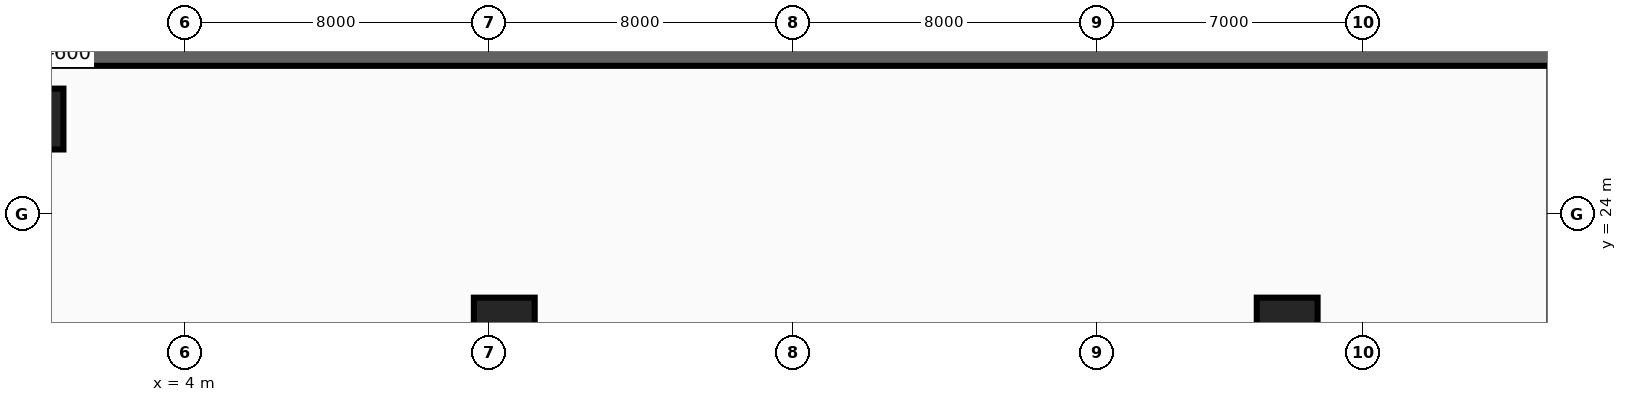
"""IFC4 building model, lengths in metres.
Left out: names, types, materials, properties, quantities, classifications, styles, units other than length and angle.
Written with IfcOpenShell. Run it as: python <this file> out.ifc"""

import sys

from ifc_helpers import new_model, si_unit, direction, frame, frame_2d, origin, origin_2d, place, context, subcontext, project, spatial, rectangle, extrude, source, transform, mapped, element, save


model = new_model("IFC4")
c1 = context("Model", 3, precision=1e-05, world=origin(), true_north=direction((0.0, 1.0)))
c2 = subcontext(c1, "Body", "Model", "MODEL_VIEW")
j1 = project(units=[si_unit("LENGTHUNIT", "METRE"), si_unit("PLANEANGLEUNIT", "RADIAN")], contexts=[c1])
p1 = place(None, origin())
s1 = spatial("IfcSite", under=j1, at=p1, CompositionType="ELEMENT")
p2 = place(p1, origin())
s2 = spatial("IfcBuilding", under=s1, at=p2, CompositionType="ELEMENT")
p3 = place(p2, frame((0.0, 0.0, -9.6)))
s3 = spatial("IfcBuildingStorey", under=s2, at=p3, CompositionType="ELEMENT", Elevation=-9.6)
p4 = place(p3, frame((-40.5, 28.2, 0.0), z_axis=(0.0, 0.0, 1.0), x_axis=(1.0, 0.0, 0.0)))
e1 = element("IfcWall", 1, at=p4, inside=s3, PredefinedType="SOLIDWALL", context=c2, shape_type="SweptSolid", body=[
    extrude(rectangle(XDim=81.0, YDim=0.6, at=frame_2d((40.5, 0.0))), origin(), (0.0, 0.0, 1.0), 4.54),
])
m1 = source(origin(), c2, "Body", "SweptSolid", [
    extrude(rectangle(XDim=1.6, YDim=1.6, at=origin_2d()), origin(), (0.0, 0.0, 1.0), 4.8),
])
for number, where, z_axis, x_axis in (
    (2, (12.4, 21.0, 0.0), (0.0, 0.0, 1.0), (1.0, 0.0, 0.0)),
    (3, (33.0, 21.0, 0.0), (0.0, 0.0, 1.0), (1.0, 0.0, 0.0)),
    (4, (0.0, 26.5, 0.0), (0.0, 0.0, 1.0), (1.0, 0.0, 0.0)),
):
    element("IfcColumn", number, at=place(p3, frame(where, z_axis=z_axis, x_axis=x_axis)), inside=s3, PredefinedType="COLUMN", context=c2, shape_type="MappedRepresentation", body=[
        mapped(m1, transform((0.0, 0.0, 0.0), x_axis=(1.0, 0.0, 0.0), y_axis=(0.0, 1.0, 0.0), z_axis=(0.0, 0.0, 1.0), scale=1.0)),
    ])
save(model, sys.argv[1])
